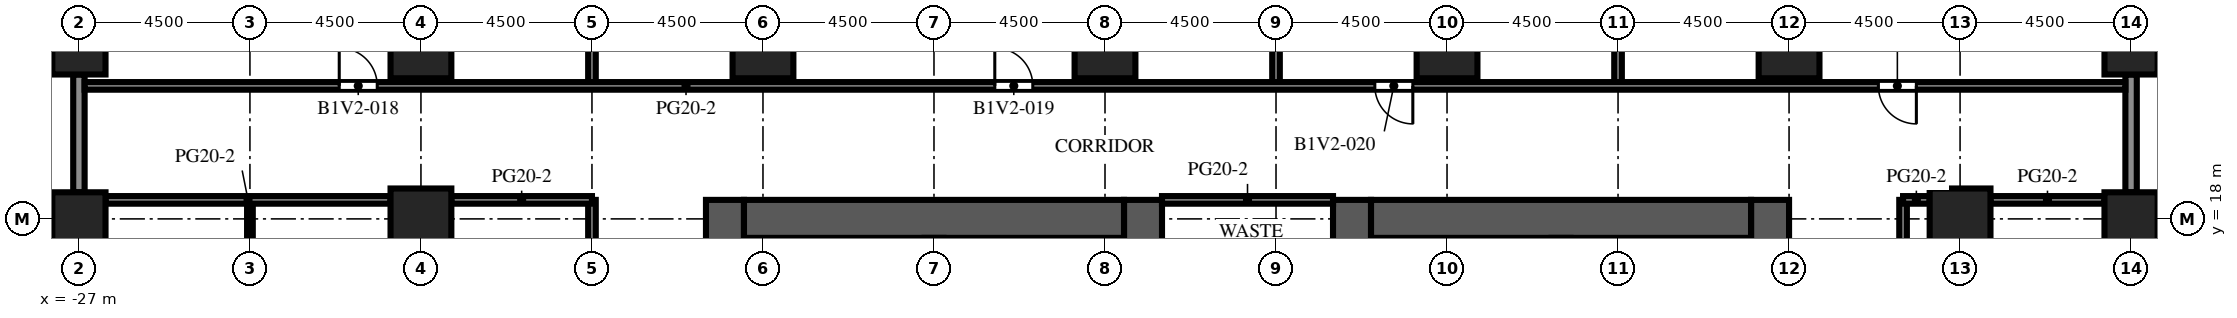
"""IFC4 building model, lengths in metres.
Left out: names, types, materials, properties, quantities, classifications, styles, units other than length and angle.
Written with IfcOpenShell. Run it as: python <this file> out.ifc"""

import sys

from ifc_helpers import new_model, si_unit, direction, frame, frame_2d, origin, origin_2d, place, context, subcontext, project, spatial, rectangle, extrude, element, fill, save


model = new_model("IFC4")
c1 = context("Model", 3, precision=1e-05, world=origin(), true_north=direction((0.0, 1.0)))
c2 = subcontext(c1, "Body", "Model", "MODEL_VIEW")
j1 = project(units=[si_unit("LENGTHUNIT", "METRE"), si_unit("PLANEANGLEUNIT", "RADIAN")], contexts=[c1])
p1 = place(None, origin())
s1 = spatial("IfcSite", under=j1, at=p1, CompositionType="ELEMENT")
p2 = place(p1, origin())
s2 = spatial("IfcBuilding", under=s1, at=p2, CompositionType="ELEMENT")
p3 = place(p2, frame((0.0, 0.0, 31.8)))
s3 = spatial("IfcBuildingStorey", under=s2, at=p3, CompositionType="ELEMENT", Elevation=31.8)
for number, where, z_axis, x_axis in (
    (1, (-27.0, 18.0, 0.0), (0.0, 0.0, 1.0), (1.0, 0.0, 0.0)),
    (2, (-27.0, 22.5, 0.0), (0.0, 0.0, 1.0), (1.0, 0.0, 0.0)),
    (3, (27.0, 18.0, 0.0), (0.0, 0.0, 1.0), (1.0, 0.0, 0.0)),
    (4, (27.0, 22.5, 0.0), (0.0, 0.0, 1.0), (1.0, 0.0, 0.0)),
):
    element("IfcColumn", number, at=place(p3, frame(where, z_axis=z_axis, x_axis=x_axis)), inside=s3, PredefinedType="COLUMN", context=c2, shape_type="SweptSolid", body=[
        extrude(rectangle(XDim=1.4, YDim=1.4, at=origin_2d()), origin(), (0.0, 0.0, 1.0), 4.1),
    ])
for number, where, z_axis, x_axis in (
    (5, (-18.0, 18.0, 0.0), (0.0, 0.0, 1.0), (1.0, 0.0, 0.0)),
    (6, (-18.0, 22.5, 0.0), (0.0, 0.0, 1.0), (1.0, 0.0, 0.0)),
    (7, (-9.0, 22.5, 0.0), (0.0, 0.0, 1.0), (1.0, 0.0, 0.0)),
    (8, (0.0, 22.5, 0.0), (0.0, 0.0, 1.0), (1.0, 0.0, 0.0)),
    (9, (9.0, 22.5, 0.0), (0.0, 0.0, 1.0), (1.0, 0.0, 0.0)),
    (10, (18.0, 22.5, 0.0), (0.0, 0.0, 1.0), (1.0, 0.0, 0.0)),
    (11, (22.5, 18.0, 0.0), (0.0, 0.0, 1.0), (1.0, 0.0, 0.0)),
):
    element("IfcColumn", number, at=place(p3, frame(where, z_axis=z_axis, x_axis=x_axis)), inside=s3, PredefinedType="COLUMN", context=c2, shape_type="SweptSolid", body=[
        extrude(rectangle(XDim=1.6, YDim=1.6, at=origin_2d()), origin(), (0.0, 0.0, 1.0), 4.1),
    ])
p4 = place(p3, frame((-10.0, -9.0, 0.0), z_axis=(0.0, 0.0, 1.0), x_axis=(0.0, 1.0, 0.0)))
e12 = element("IfcWall", 12, at=p4, inside=s3, PredefinedType="SHEAR", context=c2, shape_type="SweptSolid", body=[
    extrude(rectangle(XDim=27.5, YDim=1.0, at=frame_2d((13.75, 0.0))), origin(), (0.0, 0.0, 1.0), 4.1),
])
p5 = place(p4, frame((12.55, 0.0, 0.0)))
e13 = element("IfcOpeningElement", 13, at=p5, cuts=e12, PredefinedType="OPENING", context=c2, shape_type="SweptSolid", body=[
    extrude(rectangle(XDim=2.4, YDim=2.4, at=frame_2d((1.2, 1.2))), frame((0.0, 0.51, 0.0), z_axis=(0.0, -1.0, 0.0), x_axis=(1.0, 0.0, 0.0)), (0.0, 0.0, 1.0), 1.02),
])
p6 = place(p4, frame((6.825, 0.0, 0.0)))
e14 = element("IfcOpeningElement", 14, at=p6, cuts=e12, PredefinedType="OPENING", context=c2, shape_type="SweptSolid", body=[
    extrude(rectangle(XDim=1.2, YDim=2.1, at=frame_2d((0.6, 1.05))), frame((0.0, 0.51, 0.0), z_axis=(0.0, -1.0, 0.0), x_axis=(1.0, 0.0, 0.0)), (0.0, 0.0, 1.0), 1.02),
])
p7 = place(p4, frame((19.475, 0.0, 0.0)))
e15 = element("IfcOpeningElement", 15, at=p7, cuts=e12, PredefinedType="OPENING", context=c2, shape_type="SweptSolid", body=[
    extrude(rectangle(XDim=1.2, YDim=2.1, at=frame_2d((0.6, 1.05))), frame((0.0, 0.51, 0.0), z_axis=(0.0, -1.0, 0.0), x_axis=(1.0, 0.0, 0.0)), (0.0, 0.0, 1.0), 1.02),
])
p8 = place(p3, frame((1.0, -9.0, 0.0), z_axis=(0.0, 0.0, 1.0), x_axis=(0.0, 1.0, 0.0)))
e16 = element("IfcWall", 16, at=p8, inside=s3, PredefinedType="SHEAR", context=c2, shape_type="SweptSolid", body=[
    extrude(rectangle(XDim=27.5, YDim=1.0, at=frame_2d((13.75, 0.0))), origin(), (0.0, 0.0, 1.0), 4.1),
])
p9 = place(p8, frame((12.55, 0.0, 0.0)))
e17 = element("IfcOpeningElement", 17, at=p9, cuts=e16, PredefinedType="OPENING", context=c2, shape_type="SweptSolid", body=[
    extrude(rectangle(XDim=2.4, YDim=2.4, at=frame_2d((1.2, 1.2))), frame((0.0, 0.51, 0.0), z_axis=(0.0, -1.0, 0.0), x_axis=(1.0, 0.0, 0.0)), (0.0, 0.0, 1.0), 1.02),
])
p10 = place(p8, frame((4.025, 0.0, 0.0)))
e18 = element("IfcOpeningElement", 18, at=p10, cuts=e16, PredefinedType="OPENING", context=c2, shape_type="SweptSolid", body=[
    extrude(rectangle(XDim=1.2, YDim=2.1, at=frame_2d((0.6, 1.05))), frame((0.0, 0.51, 0.0), z_axis=(0.0, -1.0, 0.0), x_axis=(1.0, 0.0, 0.0)), (0.0, 0.0, 1.0), 1.02),
])
p11 = place(p8, frame((19.475, 0.0, 0.0)))
e19 = element("IfcOpeningElement", 19, at=p11, cuts=e16, PredefinedType="OPENING", context=c2, shape_type="SweptSolid", body=[
    extrude(rectangle(XDim=1.0, YDim=2.1, at=frame_2d((0.5, 1.05))), frame((0.0, 0.51, 0.0), z_axis=(0.0, -1.0, 0.0), x_axis=(1.0, 0.0, 0.0)), (0.0, 0.0, 1.0), 1.02),
])
p12 = place(p8, frame((21.106, 0.0, 0.0)))
e20 = element("IfcOpeningElement", 20, at=p12, cuts=e16, PredefinedType="OPENING", context=c2, shape_type="SweptSolid", body=[
    extrude(rectangle(XDim=1.0, YDim=2.1, at=frame_2d((0.5, 1.05))), frame((0.0, 0.51, 0.0), z_axis=(0.0, -1.0, 0.0), x_axis=(1.0, 0.0, 0.0)), (0.0, 0.0, 1.0), 1.02),
])
p13 = place(p8, frame((23.1, 0.0, 0.0)))
e21 = element("IfcOpeningElement", 21, at=p13, cuts=e16, PredefinedType="OPENING", context=c2, shape_type="SweptSolid", body=[
    extrude(rectangle(XDim=1.0, YDim=2.1, at=frame_2d((0.5, 1.05))), frame((0.0, 0.51, 0.0), z_axis=(0.0, -1.0, 0.0), x_axis=(1.0, 0.0, 0.0)), (0.0, 0.0, 1.0), 1.02),
])
p14 = place(p8, frame((25.094, 0.0, 0.0)))
e22 = element("IfcOpeningElement", 22, at=p14, cuts=e16, PredefinedType="OPENING", context=c2, shape_type="SweptSolid", body=[
    extrude(rectangle(XDim=1.0, YDim=2.1, at=frame_2d((0.5, 1.05))), frame((0.0, 0.51, 0.0), z_axis=(0.0, -1.0, 0.0), x_axis=(1.0, 0.0, 0.0)), (0.0, 0.0, 1.0), 1.02),
])
p15 = place(p3, frame((-9.5, 18.0, 0.0), z_axis=(0.0, 0.0, 1.0), x_axis=(1.0, 0.0, 0.0)))
e23 = element("IfcWall", 23, at=p15, inside=s3, PredefinedType="SHEAR", context=c2, shape_type="SweptSolid", body=[
    extrude(rectangle(XDim=10.0, YDim=1.0, at=frame_2d((5.0, 0.0))), origin(), (0.0, 0.0, 1.0), 4.1),
])
p16 = place(p3, frame((6.5, -9.0, 0.0), z_axis=(0.0, 0.0, 1.0), x_axis=(0.0, 1.0, 0.0)))
e24 = element("IfcWall", 24, at=p16, inside=s3, PredefinedType="SHEAR", context=c2, shape_type="SweptSolid", body=[
    extrude(rectangle(XDim=27.5, YDim=1.0, at=frame_2d((13.75, 0.0))), origin(), (0.0, 0.0, 1.0), 4.1),
])
p17 = place(p16, frame((12.55, 0.0, 0.0)))
e25 = element("IfcOpeningElement", 25, at=p17, cuts=e24, PredefinedType="OPENING", context=c2, shape_type="SweptSolid", body=[
    extrude(rectangle(XDim=2.4, YDim=2.4, at=frame_2d((1.2, 1.2))), frame((0.0, 0.51, 0.0), z_axis=(0.0, -1.0, 0.0), x_axis=(1.0, 0.0, 0.0)), (0.0, 0.0, 1.0), 1.02),
])
p18 = place(p16, frame((4.025, 0.0, 0.0)))
e26 = element("IfcOpeningElement", 26, at=p18, cuts=e24, PredefinedType="OPENING", context=c2, shape_type="SweptSolid", body=[
    extrude(rectangle(XDim=1.2, YDim=2.1, at=frame_2d((0.6, 1.05))), frame((0.0, 0.51, 0.0), z_axis=(0.0, -1.0, 0.0), x_axis=(1.0, 0.0, 0.0)), (0.0, 0.0, 1.0), 1.02),
])
p19 = place(p16, frame((19.475, 0.0, 0.0)))
e27 = element("IfcOpeningElement", 27, at=p19, cuts=e24, PredefinedType="OPENING", context=c2, shape_type="SweptSolid", body=[
    extrude(rectangle(XDim=1.0, YDim=2.1, at=frame_2d((0.5, 1.05))), frame((0.0, 0.51, 0.0), z_axis=(0.0, -1.0, 0.0), x_axis=(1.0, 0.0, 0.0)), (0.0, 0.0, 1.0), 1.02),
])
p20 = place(p16, frame((21.106, 0.0, 0.0)))
e28 = element("IfcOpeningElement", 28, at=p20, cuts=e24, PredefinedType="OPENING", context=c2, shape_type="SweptSolid", body=[
    extrude(rectangle(XDim=1.0, YDim=2.1, at=frame_2d((0.5, 1.05))), frame((0.0, 0.51, 0.0), z_axis=(0.0, -1.0, 0.0), x_axis=(1.0, 0.0, 0.0)), (0.0, 0.0, 1.0), 1.02),
])
p21 = place(p16, frame((23.1, 0.0, 0.0)))
e29 = element("IfcOpeningElement", 29, at=p21, cuts=e24, PredefinedType="OPENING", context=c2, shape_type="SweptSolid", body=[
    extrude(rectangle(XDim=1.0, YDim=2.1, at=frame_2d((0.5, 1.05))), frame((0.0, 0.51, 0.0), z_axis=(0.0, -1.0, 0.0), x_axis=(1.0, 0.0, 0.0)), (0.0, 0.0, 1.0), 1.02),
])
p22 = place(p16, frame((25.094, 0.0, 0.0)))
e30 = element("IfcOpeningElement", 30, at=p22, cuts=e24, PredefinedType="OPENING", context=c2, shape_type="SweptSolid", body=[
    extrude(rectangle(XDim=1.0, YDim=2.1, at=frame_2d((0.5, 1.05))), frame((0.0, 0.51, 0.0), z_axis=(0.0, -1.0, 0.0), x_axis=(1.0, 0.0, 0.0)), (0.0, 0.0, 1.0), 1.02),
])
p23 = place(p3, frame((17.5, -9.0, 0.0), z_axis=(0.0, 0.0, 1.0), x_axis=(0.0, 1.0, 0.0)))
e31 = element("IfcWall", 31, at=p23, inside=s3, PredefinedType="SHEAR", context=c2, shape_type="SweptSolid", body=[
    extrude(rectangle(XDim=27.5, YDim=1.0, at=frame_2d((13.75, 0.0))), origin(), (0.0, 0.0, 1.0), 4.1),
])
p24 = place(p23, frame((12.55, 0.0, 0.0)))
e32 = element("IfcOpeningElement", 32, at=p24, cuts=e31, PredefinedType="OPENING", context=c2, shape_type="SweptSolid", body=[
    extrude(rectangle(XDim=2.4, YDim=2.4, at=frame_2d((1.2, 1.2))), frame((0.0, 0.51, 0.0), z_axis=(0.0, -1.0, 0.0), x_axis=(1.0, 0.0, 0.0)), (0.0, 0.0, 1.0), 1.02),
])
p25 = place(p23, frame((6.825, 0.0, 0.0)))
e33 = element("IfcOpeningElement", 33, at=p25, cuts=e31, PredefinedType="OPENING", context=c2, shape_type="SweptSolid", body=[
    extrude(rectangle(XDim=1.2, YDim=2.1, at=frame_2d((0.6, 1.05))), frame((0.0, 0.51, 0.0), z_axis=(0.0, -1.0, 0.0), x_axis=(1.0, 0.0, 0.0)), (0.0, 0.0, 1.0), 1.02),
])
p26 = place(p23, frame((19.475, 0.0, 0.0)))
e34 = element("IfcOpeningElement", 34, at=p26, cuts=e31, PredefinedType="OPENING", context=c2, shape_type="SweptSolid", body=[
    extrude(rectangle(XDim=1.2, YDim=2.1, at=frame_2d((0.6, 1.05))), frame((0.0, 0.51, 0.0), z_axis=(0.0, -1.0, 0.0), x_axis=(1.0, 0.0, 0.0)), (0.0, 0.0, 1.0), 1.02),
])
p27 = place(p3, frame((7.0, 18.0, 0.0), z_axis=(0.0, 0.0, 1.0), x_axis=(1.0, 0.0, 0.0)))
e35 = element("IfcWall", 35, at=p27, inside=s3, PredefinedType="SHEAR", context=c2, shape_type="SweptSolid", body=[
    extrude(rectangle(XDim=10.0, YDim=1.0, at=frame_2d((5.0, 0.0))), origin(), (0.0, 0.0, 1.0), 4.1),
])
for number, where, z_axis, x_axis in (
    (36, (27.0, 21.8, 0.0), (0.0, 0.0, 1.0), (0.0, -1.0, 0.0)),
    (37, (-27.0, 18.7, 0.0), (0.0, 0.0, 1.0), (0.0, 1.0, 0.0)),
):
    element("IfcWall", number, at=place(p3, frame(where, z_axis=z_axis, x_axis=x_axis)), inside=s3, PredefinedType="SOLIDWALL", context=c2, shape_type="SweptSolid", body=[
        extrude(rectangle(XDim=3.1, YDim=0.3, at=frame_2d((1.55, 0.0))), origin(), (0.0, 0.0, 1.0), 2.6),
    ])
p28 = place(p3, frame((-22.5, -9.0, 0.0), z_axis=(0.0, 0.0, 1.0), x_axis=(0.0, 1.0, 0.0)))
e38 = element("IfcWall", 38, at=p28, inside=s3, PredefinedType="PARTITIONING", context=c2, shape_type="SweptSolid", body=[
    extrude(rectangle(XDim=27.5, YDim=0.15, at=frame_2d((13.75, 0.0))), origin(), (0.0, 0.0, 1.0), 3.5),
])
p29 = place(p28, frame((7.85, 0.0, 0.0)))
e39 = element("IfcOpeningElement", 39, at=p29, cuts=e38, PredefinedType="OPENING", context=c2, shape_type="SweptSolid", body=[
    extrude(rectangle(XDim=1.0, YDim=2.1, at=frame_2d((0.5, 1.05))), frame((0.0, 0.085, 0.0), z_axis=(0.0, -1.0, 0.0), x_axis=(1.0, 0.0, 0.0)), (0.0, 0.0, 1.0), 0.17),
])
p30 = place(p28, frame((18.85, 0.0, 0.0)))
e40 = element("IfcOpeningElement", 40, at=p30, cuts=e38, PredefinedType="OPENING", context=c2, shape_type="SweptSolid", body=[
    extrude(rectangle(XDim=1.0, YDim=2.1, at=frame_2d((0.5, 1.05))), frame((0.0, 0.085, 0.0), z_axis=(0.0, -1.0, 0.0), x_axis=(1.0, 0.0, 0.0)), (0.0, 0.0, 1.0), 0.17),
])
p31 = place(p3, frame((-13.5, -9.0, 0.0), z_axis=(0.0, 0.0, 1.0), x_axis=(0.0, 1.0, 0.0)))
e41 = element("IfcWall", 41, at=p31, inside=s3, PredefinedType="PARTITIONING", context=c2, shape_type="SweptSolid", body=[
    extrude(rectangle(XDim=27.5, YDim=0.2, at=frame_2d((13.75, 0.0))), origin(), (0.0, 0.0, 1.0), 3.5),
])
p32 = place(p31, frame((8.1, 0.0, 0.0)))
e42 = element("IfcOpeningElement", 42, at=p32, cuts=e41, PredefinedType="OPENING", context=c2, shape_type="SweptSolid", body=[
    extrude(rectangle(XDim=1.0, YDim=2.1, at=frame_2d((0.5, 1.05))), frame((0.0, 0.11, 0.0), z_axis=(0.0, -1.0, 0.0), x_axis=(1.0, 0.0, 0.0)), (0.0, 0.0, 1.0), 0.22),
])
p33 = place(p31, frame((20.6, 0.0, 0.0)))
e43 = element("IfcOpeningElement", 43, at=p33, cuts=e41, PredefinedType="OPENING", context=c2, shape_type="SweptSolid", body=[
    extrude(rectangle(XDim=1.0, YDim=2.1, at=frame_2d((0.5, 1.05))), frame((0.0, 0.11, 0.0), z_axis=(0.0, -1.0, 0.0), x_axis=(1.0, 0.0, 0.0)), (0.0, 0.0, 1.0), 0.22),
])
for number, where, z_axis, x_axis in (
    (44, (-13.5, 21.5, 0.0), (0.0, 0.0, 1.0), (0.0, 1.0, 0.0)),
    (45, (4.5, 21.5, 0.0), (0.0, 0.0, 1.0), (0.0, 1.0, 0.0)),
    (46, (13.5, 21.5, 0.0), (0.0, 0.0, 1.0), (0.0, 1.0, 0.0)),
):
    element("IfcWall", number, at=place(p3, frame(where, z_axis=z_axis, x_axis=x_axis)), inside=s3, PredefinedType="PARTITIONING", context=c2, shape_type="SweptSolid", body=[
        extrude(rectangle(XDim=4.8, YDim=0.2, at=frame_2d((2.4, 0.0))), origin(), (0.0, 0.0, 1.0), 3.5),
    ])
p34 = place(p3, frame((21.0, 18.5, 0.0), z_axis=(0.0, 0.0, 1.0), x_axis=(0.0, -1.0, 0.0)))
e47 = element("IfcWall", 47, at=p34, inside=s3, PredefinedType="PARTITIONING", context=c2, shape_type="SweptSolid", body=[
    extrude(rectangle(XDim=27.5, YDim=0.2, at=frame_2d((13.75, 0.0))), origin(), (0.0, 0.0, 1.0), 3.5),
])
p35 = place(p34, frame((21.15, 0.0, 0.0)))
e48 = element("IfcOpeningElement", 48, at=p35, cuts=e47, PredefinedType="OPENING", context=c2, shape_type="SweptSolid", body=[
    extrude(rectangle(XDim=1.0, YDim=2.1, at=frame_2d((0.5, 1.05))), frame((0.0, 0.11, 0.0), z_axis=(0.0, -1.0, 0.0), x_axis=(1.0, 0.0, 0.0)), (0.0, 0.0, 1.0), 0.22),
])
p36 = place(p34, frame((7.65, 0.0, 0.0)))
e49 = element("IfcOpeningElement", 49, at=p36, cuts=e47, PredefinedType="OPENING", context=c2, shape_type="SweptSolid", body=[
    extrude(rectangle(XDim=1.0, YDim=2.1, at=frame_2d((0.5, 1.05))), frame((0.0, 0.11, 0.0), z_axis=(0.0, -1.0, 0.0), x_axis=(1.0, 0.0, 0.0)), (0.0, 0.0, 1.0), 0.22),
])
p37 = place(p3, frame((-26.3, 18.5, 0.0), z_axis=(0.0, 0.0, 1.0), x_axis=(1.0, 0.0, 0.0)))
e50 = element("IfcWall", 50, at=p37, inside=s3, PredefinedType="PARTITIONING", context=c2, shape_type="SweptSolid", body=[
    extrude(rectangle(XDim=7.5, YDim=0.2, at=frame_2d((3.75, 0.0))), origin(), (0.0, 0.0, 1.0), 3.5),
])
p38 = place(p3, frame((-17.2, 18.5, 0.0), z_axis=(0.0, 0.0, 1.0), x_axis=(1.0, 0.0, 0.0)))
e51 = element("IfcWall", 51, at=p38, inside=s3, PredefinedType="PARTITIONING", context=c2, shape_type="SweptSolid", body=[
    extrude(rectangle(XDim=3.7, YDim=0.2, at=frame_2d((1.85, 0.0))), origin(), (0.0, 0.0, 1.0), 3.5),
])
p39 = place(p3, frame((1.5, 18.5, 0.0), z_axis=(0.0, 0.0, 1.0), x_axis=(1.0, 0.0, 0.0)))
e52 = element("IfcWall", 52, at=p39, inside=s3, PredefinedType="PARTITIONING", context=c2, shape_type="SweptSolid", body=[
    extrude(rectangle(XDim=4.5, YDim=0.2, at=frame_2d((2.25, 0.0))), origin(), (0.0, 0.0, 1.0), 3.5),
])
p40 = place(p3, frame((21.0, 18.5, 0.0), z_axis=(0.0, 0.0, 1.0), x_axis=(1.0, 0.0, 0.0)))
e53 = element("IfcWall", 53, at=p40, inside=s3, PredefinedType="PARTITIONING", context=c2, shape_type="SweptSolid", body=[
    extrude(rectangle(XDim=0.7, YDim=0.2, at=frame_2d((0.35, 0.0))), origin(), (0.0, 0.0, 1.0), 3.5),
])
p41 = place(p3, frame((23.3, 18.5, 0.0), z_axis=(0.0, 0.0, 1.0), x_axis=(1.0, 0.0, 0.0)))
e54 = element("IfcWall", 54, at=p41, inside=s3, PredefinedType="PARTITIONING", context=c2, shape_type="SweptSolid", body=[
    extrude(rectangle(XDim=3.0, YDim=0.2, at=frame_2d((1.5, 0.0))), origin(), (0.0, 0.0, 1.0), 3.5),
])
p42 = place(p3, frame((-26.85, 21.5, 0.0), z_axis=(0.0, 0.0, 1.0), x_axis=(1.0, 0.0, 0.0)))
e55 = element("IfcWall", 55, at=p42, inside=s3, PredefinedType="PARTITIONING", context=c2, shape_type="SweptSolid", body=[
    extrude(rectangle(XDim=53.7, YDim=0.2, at=frame_2d((26.85, 0.0))), origin(), (0.0, 0.0, 1.0), 3.5),
])
p43 = place(p42, frame((6.7, 0.0, 0.0)))
e56 = element("IfcOpeningElement", 56, at=p43, cuts=e55, PredefinedType="OPENING", context=c2, shape_type="SweptSolid", body=[
    extrude(rectangle(XDim=1.0, YDim=2.1, at=frame_2d((0.5, 1.05))), frame((0.0, 0.11, 0.0), z_axis=(0.0, -1.0, 0.0), x_axis=(1.0, 0.0, 0.0)), (0.0, 0.0, 1.0), 0.22),
])
p44 = place(p42, frame((23.95, 0.0, 0.0)))
e57 = element("IfcOpeningElement", 57, at=p44, cuts=e55, PredefinedType="OPENING", context=c2, shape_type="SweptSolid", body=[
    extrude(rectangle(XDim=1.0, YDim=2.1, at=frame_2d((0.5, 1.05))), frame((0.0, 0.11, 0.0), z_axis=(0.0, -1.0, 0.0), x_axis=(1.0, 0.0, 0.0)), (0.0, 0.0, 1.0), 0.22),
])
p45 = place(p42, frame((33.95, 0.0, 0.0)))
e58 = element("IfcOpeningElement", 58, at=p45, cuts=e55, PredefinedType="OPENING", context=c2, shape_type="SweptSolid", body=[
    extrude(rectangle(XDim=1.0, YDim=2.1, at=frame_2d((0.5, 1.05))), frame((0.0, 0.11, 0.0), z_axis=(0.0, -1.0, 0.0), x_axis=(1.0, 0.0, 0.0)), (0.0, 0.0, 1.0), 0.22),
])
p46 = place(p42, frame((47.2, 0.0, 0.0)))
e59 = element("IfcOpeningElement", 59, at=p46, cuts=e55, PredefinedType="OPENING", context=c2, shape_type="SweptSolid", body=[
    extrude(rectangle(XDim=1.0, YDim=2.1, at=frame_2d((0.5, 1.05))), frame((0.0, 0.11, 0.0), z_axis=(0.0, -1.0, 0.0), x_axis=(1.0, 0.0, 0.0)), (0.0, 0.0, 1.0), 0.22),
])
p47 = place(p43, origin())
e60 = element("IfcDoor", 60, at=p47, inside=s3, OperationType="SINGLE_SWING_LEFT", PredefinedType="DOOR", context=c2, shape_type="SweptSolid", body=[
    extrude(rectangle(XDim=1.0, YDim=2.1, at=frame_2d((0.5, 1.05))), frame((0.0, 0.025, 0.0), z_axis=(0.0, -1.0, 0.0), x_axis=(1.0, 0.0, 0.0)), (0.0, 0.0, 1.0), 0.05),
])
fill(e56, e60)
p48 = place(p44, origin())
e61 = element("IfcDoor", 61, at=p48, inside=s3, OperationType="SINGLE_SWING_LEFT", PredefinedType="DOOR", context=c2, shape_type="SweptSolid", body=[
    extrude(rectangle(XDim=1.0, YDim=2.1, at=frame_2d((0.5, 1.05))), frame((0.0, 0.025, 0.0), z_axis=(0.0, -1.0, 0.0), x_axis=(1.0, 0.0, 0.0)), (0.0, 0.0, 1.0), 0.05),
])
fill(e57, e61)
p49 = place(p45, origin())
e62 = element("IfcDoor", 62, at=p49, inside=s3, OperationType="SINGLE_SWING_RIGHT", PredefinedType="DOOR", context=c2, shape_type="SweptSolid", body=[
    extrude(rectangle(XDim=1.0, YDim=2.1, at=frame_2d((0.5, 1.05))), frame((0.0, 0.025, 0.0), z_axis=(0.0, -1.0, 0.0), x_axis=(1.0, 0.0, 0.0)), (0.0, 0.0, 1.0), 0.05),
])
fill(e58, e62)
p50 = place(p46, origin())
e63 = element("IfcDoor", 63, at=p50, inside=s3, OperationType="SINGLE_SWING_RIGHT", PredefinedType="DOOR", context=c2, shape_type="SweptSolid", body=[
    extrude(rectangle(XDim=1.0, YDim=2.1, at=frame_2d((0.5, 1.05))), frame((0.0, 0.025, 0.0), z_axis=(0.0, -1.0, 0.0), x_axis=(1.0, 0.0, 0.0)), (0.0, 0.0, 1.0), 0.05),
])
fill(e59, e63)
save(model, sys.argv[1])
